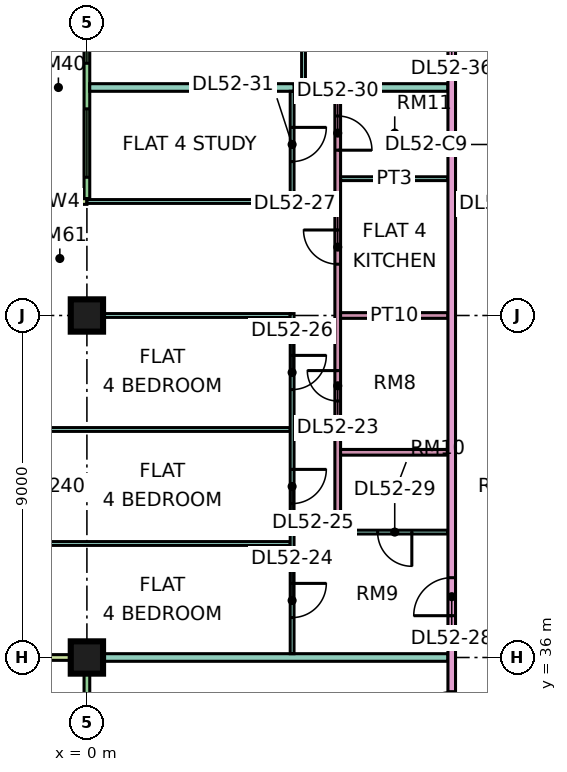
"""IFC4 building model, lengths in metres.
Left out: names, types, materials, properties, quantities, classifications, styles, units other than length and angle.
Written with IfcOpenShell. Run it as: python <this file> out.ifc"""

import sys

from ifc_helpers import new_model, si_unit, direction, frame, frame_2d, origin, origin_2d, place, context, subcontext, project, spatial, rectangle, extrude, element, fill, save


model = new_model("IFC4")
c1 = context("Model", 3, precision=1e-05, world=origin(), true_north=direction((0.0, 1.0)))
c2 = subcontext(c1, "Body", "Model", "MODEL_VIEW")
j1 = project(units=[si_unit("LENGTHUNIT", "METRE"), si_unit("PLANEANGLEUNIT", "RADIAN")], contexts=[c1])
p1 = place(None, origin())
s1 = spatial("IfcSite", under=j1, at=p1, CompositionType="ELEMENT")
p2 = place(p1, origin())
s2 = spatial("IfcBuilding", under=s1, at=p2, CompositionType="ELEMENT")
p3 = place(p2, frame((0.0, 0.0, 222.9)))
s3 = spatial("IfcBuildingStorey", under=s2, at=p3, CompositionType="ELEMENT", Elevation=222.9)
p4 = place(p3, frame((0.0, 36.0, 0.0), z_axis=(0.0, 0.0, 1.0), x_axis=(1.0, 0.0, 0.0)))
e1 = element("IfcColumn", 1, at=p4, inside=s3, PredefinedType="COLUMN", context=c2, shape_type="SweptSolid", body=[
    extrude(rectangle(XDim=0.85, YDim=0.85, at=origin_2d()), origin(), (0.0, 0.0, 1.0), 3.75),
])
p5 = place(p3, frame((0.0, 45.0, 0.0), z_axis=(0.0, 0.0, 1.0), x_axis=(1.0, 0.0, 0.0)))
e2 = element("IfcColumn", 2, at=p5, inside=s3, PredefinedType="COLUMN", context=c2, shape_type="SweptSolid", body=[
    extrude(rectangle(XDim=0.85, YDim=0.85, at=origin_2d()), origin(), (0.0, 0.0, 1.0), 3.75),
])
p6 = place(p3, frame((0.0, 61.425, 0.0), z_axis=(0.0, 0.0, 1.0), x_axis=(0.0, -1.0, 0.0)))
e3 = element("IfcWall", 3, at=p6, inside=s3, PredefinedType="SOLIDWALL", context=c2, shape_type="SweptSolid", body=[
    extrude(rectangle(XDim=13.35, YDim=0.15, at=frame_2d((6.675, 0.0))), origin(), (0.0, 0.0, 1.0), 3.35),
])
p7 = place(p6, frame((2.025, 0.0, 0.0)))
e4 = element("IfcOpeningElement", 4, at=p7, cuts=e3, PredefinedType="OPENING", context=c2, shape_type="SweptSolid", body=[
    extrude(rectangle(XDim=1.8, YDim=2.4, at=frame_2d((0.9, 1.2))), frame((0.0, 0.085, 0.0), z_axis=(0.0, -1.0, 0.0), x_axis=(1.0, 0.0, 0.0)), (0.0, 0.0, 1.0), 0.17),
])
p8 = place(p6, frame((5.062, 0.0, 0.45)))
e5 = element("IfcOpeningElement", 5, at=p8, cuts=e3, PredefinedType="OPENING", context=c2, shape_type="SweptSolid", body=[
    extrude(rectangle(XDim=1.2, YDim=2.4, at=frame_2d((0.6, 1.2))), frame((0.0, 0.085, 0.0), z_axis=(0.0, -1.0, 0.0), x_axis=(1.0, 0.0, 0.0)), (0.0, 0.0, 1.0), 0.17),
])
p9 = place(p6, frame((8.587, 0.0, 0.45)))
e6 = element("IfcOpeningElement", 6, at=p9, cuts=e3, PredefinedType="OPENING", context=c2, shape_type="SweptSolid", body=[
    extrude(rectangle(XDim=1.2, YDim=2.4, at=frame_2d((0.6, 1.2))), frame((0.0, 0.085, 0.0), z_axis=(0.0, -1.0, 0.0), x_axis=(1.0, 0.0, 0.0)), (0.0, 0.0, 1.0), 0.17),
])
p10 = place(p6, frame((10.988, 0.0, 0.45)))
e7 = element("IfcOpeningElement", 7, at=p10, cuts=e3, PredefinedType="OPENING", context=c2, shape_type="SweptSolid", body=[
    extrude(rectangle(XDim=1.8, YDim=2.4, at=frame_2d((0.9, 1.2))), frame((0.0, 0.085, 0.0), z_axis=(0.0, -1.0, 0.0), x_axis=(1.0, 0.0, 0.0)), (0.0, 0.0, 1.0), 0.17),
])
p11 = place(p3, frame((-1.5, 48.0, 0.0), z_axis=(0.0, 0.0, 1.0), x_axis=(1.0, 0.0, 0.0)))
e8 = element("IfcWall", 8, at=p11, inside=s3, PredefinedType="SOLIDWALL", context=c2, shape_type="SweptSolid", body=[
    extrude(rectangle(XDim=1.5, YDim=0.15, at=frame_2d((0.75, 0.0))), origin(), (0.0, 0.0, 1.0), 3.35),
])
p12 = place(p3, frame((0.0, 35.925, 0.0), z_axis=(0.0, 0.0, 1.0), x_axis=(0.0, -1.0, 0.0)))
e9 = element("IfcWall", 9, at=p12, inside=s3, PredefinedType="SOLIDWALL", context=c2, shape_type="SweptSolid", body=[
    extrude(rectangle(XDim=11.85, YDim=0.15, at=frame_2d((5.925, 0.0))), origin(), (0.0, 0.0, 1.0), 3.35),
])
p13 = place(p12, frame((2.288, 0.0, 0.0)))
e10 = element("IfcOpeningElement", 10, at=p13, cuts=e9, PredefinedType="OPENING", context=c2, shape_type="SweptSolid", body=[
    extrude(rectangle(XDim=1.8, YDim=2.4, at=frame_2d((0.9, 1.2))), frame((0.0, 0.085, 0.0), z_axis=(0.0, -1.0, 0.0), x_axis=(1.0, 0.0, 0.0)), (0.0, 0.0, 1.0), 0.17),
])
p14 = place(p12, frame((6.525, 0.0, 0.45)))
e11 = element("IfcOpeningElement", 11, at=p14, cuts=e9, PredefinedType="OPENING", context=c2, shape_type="SweptSolid", body=[
    extrude(rectangle(XDim=1.8, YDim=2.4, at=frame_2d((0.9, 1.2))), frame((0.0, 0.085, 0.0), z_axis=(0.0, -1.0, 0.0), x_axis=(1.0, 0.0, 0.0)), (0.0, 0.0, 1.0), 0.17),
])
p15 = place(p12, frame((9.562, 0.0, 0.45)))
e12 = element("IfcOpeningElement", 12, at=p15, cuts=e9, PredefinedType="OPENING", context=c2, shape_type="SweptSolid", body=[
    extrude(rectangle(XDim=1.2, YDim=2.4, at=frame_2d((0.6, 1.2))), frame((0.0, 0.085, 0.0), z_axis=(0.0, -1.0, 0.0), x_axis=(1.0, 0.0, 0.0)), (0.0, 0.0, 1.0), 0.17),
])
p16 = place(p3, frame((-1.5, 36.0, 0.0), z_axis=(0.0, 0.0, 1.0), x_axis=(1.0, 0.0, 0.0)))
e13 = element("IfcWall", 13, at=p16, inside=s3, PredefinedType="SOLIDWALL", context=c2, shape_type="SweptSolid", body=[
    extrude(rectangle(XDim=1.5, YDim=0.15, at=frame_2d((0.75, 0.0))), origin(), (0.0, 0.0, 1.0), 3.35),
])
for number, where, z_axis, x_axis in (
    (14, (-1.351, 39.0, 0.0), (0.0, 0.0, 1.0), (1.0, 0.0, 0.0)),
    (15, (-1.351, 42.0, 0.0), (0.0, 0.0, 1.0), (1.0, 0.0, 0.0)),
):
    element("IfcWall", number, at=place(p3, frame(where, z_axis=z_axis, x_axis=x_axis)), inside=s3, PredefinedType="PARTITIONING", context=c2, shape_type="SweptSolid", body=[
        extrude(rectangle(XDim=6.701, YDim=0.1, at=frame_2d((3.351, 0.0))), origin(), (0.0, 0.0, 1.0), 3.35),
    ])
e16 = element("IfcWall", 16, at=p4, inside=s3, PredefinedType="PARTITIONING", context=c2, shape_type="SweptSolid", body=[
    extrude(rectangle(XDim=9.5, YDim=0.2, at=frame_2d((4.75, 0.0))), origin(), (0.0, 0.0, 1.0), 3.35),
])
e17 = element("IfcWall", 17, at=p5, inside=s3, PredefinedType="PARTITIONING", context=c2, shape_type="SweptSolid", body=[
    extrude(rectangle(XDim=5.35, YDim=0.1, at=frame_2d((2.675, 0.0))), origin(), (0.0, 0.0, 1.0), 3.35),
])
p17 = place(p3, frame((0.0, 48.0, 0.0), z_axis=(0.0, 0.0, 1.0), x_axis=(1.0, 0.0, 0.0)))
e18 = element("IfcWall", 18, at=p17, inside=s3, PredefinedType="PARTITIONING", context=c2, shape_type="SweptSolid", body=[
    extrude(rectangle(XDim=5.45, YDim=0.1, at=frame_2d((2.725, 0.0))), origin(), (0.0, 0.0, 1.0), 3.35),
])
p18 = place(p3, frame((0.074, 51.0, 0.0), z_axis=(0.0, 0.0, 1.0), x_axis=(1.0, 0.0, 0.0)))
e19 = element("IfcWall", 19, at=p18, inside=s3, PredefinedType="PARTITIONING", context=c2, shape_type="SweptSolid", body=[
    extrude(rectangle(XDim=5.376, YDim=0.2, at=frame_2d((2.688, 0.0))), origin(), (0.0, 0.0, 1.0), 3.35),
])
p19 = place(p3, frame((5.4, 36.1, 0.0), z_axis=(0.0, 0.0, 1.0), x_axis=(0.0, 1.0, 0.0)))
e20 = element("IfcWall", 20, at=p19, inside=s3, PredefinedType="PARTITIONING", context=c2, shape_type="SweptSolid", body=[
    extrude(rectangle(XDim=8.95, YDim=0.1, at=frame_2d((4.475, 0.0))), origin(), (0.0, 0.0, 1.0), 3.35),
])
p20 = place(p19, frame((0.95, 0.0, 0.0)))
e21 = element("IfcOpeningElement", 21, at=p20, cuts=e20, PredefinedType="OPENING", context=c2, shape_type="SweptSolid", body=[
    extrude(rectangle(XDim=0.9, YDim=2.1, at=frame_2d((0.45, 1.05))), frame((0.0, 0.06, 0.0), z_axis=(0.0, -1.0, 0.0), x_axis=(1.0, 0.0, 0.0)), (0.0, 0.0, 1.0), 0.12),
])
p21 = place(p19, frame((3.95, 0.0, 0.0)))
e22 = element("IfcOpeningElement", 22, at=p21, cuts=e20, PredefinedType="OPENING", context=c2, shape_type="SweptSolid", body=[
    extrude(rectangle(XDim=0.9, YDim=2.1, at=frame_2d((0.45, 1.05))), frame((0.0, 0.06, 0.0), z_axis=(0.0, -1.0, 0.0), x_axis=(1.0, 0.0, 0.0)), (0.0, 0.0, 1.0), 0.12),
])
p22 = place(p19, frame((6.95, 0.0, 0.0)))
e23 = element("IfcOpeningElement", 23, at=p22, cuts=e20, PredefinedType="OPENING", context=c2, shape_type="SweptSolid", body=[
    extrude(rectangle(XDim=0.9, YDim=2.1, at=frame_2d((0.45, 1.05))), frame((0.0, 0.06, 0.0), z_axis=(0.0, -1.0, 0.0), x_axis=(1.0, 0.0, 0.0)), (0.0, 0.0, 1.0), 0.12),
])
p23 = place(p3, frame((5.4, 48.05, 0.0), z_axis=(0.0, 0.0, 1.0), x_axis=(0.0, 1.0, 0.0)))
e24 = element("IfcWall", 24, at=p23, inside=s3, PredefinedType="PARTITIONING", context=c2, shape_type="SweptSolid", body=[
    extrude(rectangle(XDim=2.85, YDim=0.1, at=frame_2d((1.425, 0.0))), origin(), (0.0, 0.0, 1.0), 3.35),
])
p24 = place(p23, frame((1.0, 0.0, 0.0)))
e25 = element("IfcOpeningElement", 25, at=p24, cuts=e24, PredefinedType="OPENING", context=c2, shape_type="SweptSolid", body=[
    extrude(rectangle(XDim=0.9, YDim=2.1, at=frame_2d((0.45, 1.05))), frame((0.0, 0.06, 0.0), z_axis=(0.0, -1.0, 0.0), x_axis=(1.0, 0.0, 0.0)), (0.0, 0.0, 1.0), 0.12),
])
p25 = place(p3, frame((5.65, 51.0, 0.0), z_axis=(0.0, 0.0, 1.0), x_axis=(1.0, 0.0, 0.0)))
e26 = element("IfcWall", 26, at=p25, inside=s3, PredefinedType="PARTITIONING", context=c2, shape_type="SweptSolid", body=[
    extrude(rectangle(XDim=3.85, YDim=0.2, at=frame_2d((1.925, 0.0))), origin(), (0.0, 0.0, 1.0), 3.35),
])
p26 = place(p3, frame((5.7, 51.1, 0.0), z_axis=(0.0, 0.0, 1.0), x_axis=(0.0, 1.0, 0.0)))
e27 = element("IfcWall", 27, at=p26, inside=s3, PredefinedType="PARTITIONING", context=c2, shape_type="SweptSolid", body=[
    extrude(rectangle(XDim=8.95, YDim=0.1, at=frame_2d((4.475, 0.0))), origin(), (0.0, 0.0, 1.0), 3.35),
])
p27 = place(p26, frame((0.95, 0.0, 0.0)))
e28 = element("IfcOpeningElement", 28, at=p27, cuts=e27, PredefinedType="OPENING", context=c2, shape_type="SweptSolid", body=[
    extrude(rectangle(XDim=0.9, YDim=2.1, at=frame_2d((0.45, 1.05))), frame((0.0, 0.06, 0.0), z_axis=(0.0, -1.0, 0.0), x_axis=(1.0, 0.0, 0.0)), (0.0, 0.0, 1.0), 0.12),
])
p28 = place(p26, frame((3.95, 0.0, 0.0)))
e29 = element("IfcOpeningElement", 29, at=p28, cuts=e27, PredefinedType="OPENING", context=c2, shape_type="SweptSolid", body=[
    extrude(rectangle(XDim=0.9, YDim=2.1, at=frame_2d((0.45, 1.05))), frame((0.0, 0.06, 0.0), z_axis=(0.0, -1.0, 0.0), x_axis=(1.0, 0.0, 0.0)), (0.0, 0.0, 1.0), 0.12),
])
p29 = place(p26, frame((6.95, 0.0, 0.0)))
e30 = element("IfcOpeningElement", 30, at=p29, cuts=e27, PredefinedType="OPENING", context=c2, shape_type="SweptSolid", body=[
    extrude(rectangle(XDim=0.9, YDim=2.1, at=frame_2d((0.45, 1.05))), frame((0.0, 0.06, 0.0), z_axis=(0.0, -1.0, 0.0), x_axis=(1.0, 0.0, 0.0)), (0.0, 0.0, 1.0), 0.12),
])
p30 = place(p3, frame((6.6, 39.25, 0.0), z_axis=(0.0, 0.0, 1.0), x_axis=(0.0, 1.0, 0.0)))
e31 = element("IfcWall", 31, at=p30, inside=s3, PredefinedType="PARTITIONING", context=c2, shape_type="SweptSolid", body=[
    extrude(rectangle(XDim=11.65, YDim=0.15, at=frame_2d((5.825, 0.0))), origin(), (0.0, 0.0, 1.0), 3.35),
])
p31 = place(p30, frame((3.5, 0.0, 0.0)))
e32 = element("IfcOpeningElement", 32, at=p31, cuts=e31, PredefinedType="OPENING", context=c2, shape_type="SweptSolid", body=[
    extrude(rectangle(XDim=0.8, YDim=2.1, at=frame_2d((0.4, 1.05))), frame((0.0, 0.085, 0.0), z_axis=(0.0, -1.0, 0.0), x_axis=(1.0, 0.0, 0.0)), (0.0, 0.0, 1.0), 0.17),
])
p32 = place(p30, frame((7.1, 0.0, 0.0)))
e33 = element("IfcOpeningElement", 33, at=p32, cuts=e31, PredefinedType="OPENING", context=c2, shape_type="SweptSolid", body=[
    extrude(rectangle(XDim=0.9, YDim=2.1, at=frame_2d((0.45, 1.05))), frame((0.0, 0.085, 0.0), z_axis=(0.0, -1.0, 0.0), x_axis=(1.0, 0.0, 0.0)), (0.0, 0.0, 1.0), 0.17),
])
p33 = place(p30, frame((10.1, 0.0, 0.0)))
e34 = element("IfcOpeningElement", 34, at=p33, cuts=e31, PredefinedType="OPENING", context=c2, shape_type="SweptSolid", body=[
    extrude(rectangle(XDim=0.9, YDim=2.1, at=frame_2d((0.45, 1.05))), frame((0.0, 0.085, 0.0), z_axis=(0.0, -1.0, 0.0), x_axis=(1.0, 0.0, 0.0)), (0.0, 0.0, 1.0), 0.17),
])
p34 = place(p3, frame((6.675, 39.3, 0.0), z_axis=(0.0, 0.0, 1.0), x_axis=(1.0, 0.0, 0.0)))
e35 = element("IfcWall", 35, at=p34, inside=s3, PredefinedType="PARTITIONING", context=c2, shape_type="SweptSolid", body=[
    extrude(rectangle(XDim=2.825, YDim=0.1, at=frame_2d((1.413, 0.0))), origin(), (0.0, 0.0, 1.0), 3.35),
])
p35 = place(p34, frame((0.975, 0.0, 0.0)))
e36 = element("IfcOpeningElement", 36, at=p35, cuts=e35, PredefinedType="OPENING", context=c2, shape_type="SweptSolid", body=[
    extrude(rectangle(XDim=0.9, YDim=2.1, at=frame_2d((0.45, 1.05))), frame((0.0, 0.06, 0.0), z_axis=(0.0, -1.0, 0.0), x_axis=(1.0, 0.0, 0.0)), (0.0, 0.0, 1.0), 0.12),
])
for number, where, z_axis, x_axis in (
    (37, (6.675, 41.4, 0.0), (0.0, 0.0, 1.0), (1.0, 0.0, 0.0)),
    (38, (6.675, 45.0, 0.0), (0.0, 0.0, 1.0), (1.0, 0.0, 0.0)),
):
    element("IfcWall", number, at=place(p3, frame(where, z_axis=z_axis, x_axis=x_axis)), inside=s3, PredefinedType="PARTITIONING", context=c2, shape_type="SweptSolid", body=[
        extrude(rectangle(XDim=2.825, YDim=0.15, at=frame_2d((1.413, 0.0))), origin(), (0.0, 0.0, 1.0), 3.35),
    ])
p36 = place(p3, frame((6.675, 48.6, 0.0), z_axis=(0.0, 0.0, 1.0), x_axis=(1.0, 0.0, 0.0)))
e39 = element("IfcWall", 39, at=p36, inside=s3, PredefinedType="PARTITIONING", context=c2, shape_type="SweptSolid", body=[
    extrude(rectangle(XDim=2.825, YDim=0.1, at=frame_2d((1.413, 0.0))), origin(), (0.0, 0.0, 1.0), 3.35),
])
p37 = place(p3, frame((9.6, 20.0, 0.0), z_axis=(0.0, 0.0, 1.0), x_axis=(0.0, 1.0, 0.0)))
e40 = element("IfcWall", 40, at=p37, inside=s3, PredefinedType="PARTITIONING", context=c2, shape_type="SweptSolid", body=[
    extrude(rectangle(XDim=42.926, YDim=0.2, at=frame_2d((21.463, 0.0))), origin(), (0.0, 0.0, 1.0), 3.35),
])
p38 = place(p37, frame((17.1, 0.0, 0.0)))
e41 = element("IfcOpeningElement", 41, at=p38, cuts=e40, PredefinedType="OPENING", context=c2, shape_type="SweptSolid", body=[
    extrude(rectangle(XDim=1.0, YDim=2.1, at=frame_2d((0.5, 1.05))), frame((0.0, 0.11, 0.0), z_axis=(0.0, -1.0, 0.0), x_axis=(1.0, 0.0, 0.0)), (0.0, 0.0, 1.0), 0.22),
])
p39 = place(p37, frame((32.1, 0.0, 0.0)))
e42 = element("IfcOpeningElement", 42, at=p39, cuts=e40, PredefinedType="OPENING", context=c2, shape_type="SweptSolid", body=[
    extrude(rectangle(XDim=1.0, YDim=2.1, at=frame_2d((0.5, 1.05))), frame((0.0, 0.11, 0.0), z_axis=(0.0, -1.0, 0.0), x_axis=(1.0, 0.0, 0.0)), (0.0, 0.0, 1.0), 0.22),
])
p40 = place(p37, frame((0.6, 0.0, 0.0)))
e43 = element("IfcOpeningElement", 43, at=p40, cuts=e40, PredefinedType="OPENING", context=c2, shape_type="SweptSolid", body=[
    extrude(rectangle(XDim=1.2, YDim=2.1, at=frame_2d((0.6, 1.05))), frame((0.0, 0.11, 0.0), z_axis=(0.0, -1.0, 0.0), x_axis=(1.0, 0.0, 0.0)), (0.0, 0.0, 1.0), 0.22),
])
p41 = place(p37, frame((14.1, 0.0, 0.0)))
e44 = element("IfcOpeningElement", 44, at=p41, cuts=e40, PredefinedType="OPENING", context=c2, shape_type="SweptSolid", body=[
    extrude(rectangle(XDim=1.0, YDim=2.1, at=frame_2d((0.5, 1.05))), frame((0.0, 0.11, 0.0), z_axis=(0.0, -1.0, 0.0), x_axis=(1.0, 0.0, 0.0)), (0.0, 0.0, 1.0), 0.22),
])
p42 = place(p9, origin())
e45 = element("IfcWindow", 45, at=p42, inside=s3, PartitioningType="SINGLE_PANEL", PredefinedType="WINDOW", context=c2, shape_type="SweptSolid", body=[
    extrude(rectangle(XDim=1.2, YDim=2.4, at=frame_2d((0.6, 1.2))), frame((0.0, 0.03, 0.0), z_axis=(0.0, -1.0, 0.0), x_axis=(1.0, 0.0, 0.0)), (0.0, 0.0, 1.0), 0.06),
])
fill(e6, e45)
p43 = place(p10, origin())
e46 = element("IfcWindow", 46, at=p43, inside=s3, PartitioningType="SINGLE_PANEL", PredefinedType="WINDOW", context=c2, shape_type="SweptSolid", body=[
    extrude(rectangle(XDim=1.8, YDim=2.4, at=frame_2d((0.9, 1.2))), frame((0.0, 0.03, 0.0), z_axis=(0.0, -1.0, 0.0), x_axis=(1.0, 0.0, 0.0)), (0.0, 0.0, 1.0), 0.06),
])
fill(e7, e46)
p44 = place(p31, frame((0.8, 0.0, 0.0), z_axis=(0.0, 0.0, 1.0), x_axis=(-1.0, 0.0, 0.0)))
e47 = element("IfcDoor", 47, at=p44, inside=s3, OperationType="SINGLE_SWING_RIGHT", PredefinedType="DOOR", context=c2, shape_type="SweptSolid", body=[
    extrude(rectangle(XDim=0.8, YDim=2.1, at=frame_2d((0.4, 1.05))), frame((0.0, 0.025, 0.0), z_axis=(0.0, -1.0, 0.0), x_axis=(1.0, 0.0, 0.0)), (0.0, 0.0, 1.0), 0.05),
])
fill(e32, e47)
p45 = place(p20, origin())
e48 = element("IfcDoor", 48, at=p45, inside=s3, OperationType="SINGLE_SWING_RIGHT", PredefinedType="DOOR", context=c2, shape_type="SweptSolid", body=[
    extrude(rectangle(XDim=0.9, YDim=2.1, at=frame_2d((0.45, 1.05))), frame((0.0, 0.025, 0.0), z_axis=(0.0, -1.0, 0.0), x_axis=(1.0, 0.0, 0.0)), (0.0, 0.0, 1.0), 0.05),
])
fill(e21, e48)
p46 = place(p21, origin())
e49 = element("IfcDoor", 49, at=p46, inside=s3, OperationType="SINGLE_SWING_RIGHT", PredefinedType="DOOR", context=c2, shape_type="SweptSolid", body=[
    extrude(rectangle(XDim=0.9, YDim=2.1, at=frame_2d((0.45, 1.05))), frame((0.0, 0.025, 0.0), z_axis=(0.0, -1.0, 0.0), x_axis=(1.0, 0.0, 0.0)), (0.0, 0.0, 1.0), 0.05),
])
fill(e22, e49)
p47 = place(p22, origin())
e50 = element("IfcDoor", 50, at=p47, inside=s3, OperationType="SINGLE_SWING_RIGHT", PredefinedType="DOOR", context=c2, shape_type="SweptSolid", body=[
    extrude(rectangle(XDim=0.9, YDim=2.1, at=frame_2d((0.45, 1.05))), frame((0.0, 0.025, 0.0), z_axis=(0.0, -1.0, 0.0), x_axis=(1.0, 0.0, 0.0)), (0.0, 0.0, 1.0), 0.05),
])
fill(e23, e50)
p48 = place(p32, frame((0.9, 0.0, 0.0), z_axis=(0.0, 0.0, 1.0), x_axis=(-1.0, 0.0, 0.0)))
e51 = element("IfcDoor", 51, at=p48, inside=s3, OperationType="SINGLE_SWING_RIGHT", PredefinedType="DOOR", context=c2, shape_type="SweptSolid", body=[
    extrude(rectangle(XDim=0.9, YDim=2.1, at=frame_2d((0.45, 1.05))), frame((0.0, 0.025, 0.0), z_axis=(0.0, -1.0, 0.0), x_axis=(1.0, 0.0, 0.0)), (0.0, 0.0, 1.0), 0.05),
])
fill(e33, e51)
p49 = place(p38, origin())
e52 = element("IfcDoor", 52, at=p49, inside=s3, OperationType="SINGLE_SWING_LEFT", PredefinedType="DOOR", context=c2, shape_type="SweptSolid", body=[
    extrude(rectangle(XDim=1.0, YDim=2.1, at=frame_2d((0.5, 1.05))), frame((0.0, 0.025, 0.0), z_axis=(0.0, -1.0, 0.0), x_axis=(1.0, 0.0, 0.0)), (0.0, 0.0, 1.0), 0.05),
])
fill(e41, e52)
p50 = place(p35, origin())
e53 = element("IfcDoor", 53, at=p50, inside=s3, OperationType="SINGLE_SWING_RIGHT", PredefinedType="DOOR", context=c2, shape_type="SweptSolid", body=[
    extrude(rectangle(XDim=0.9, YDim=2.1, at=frame_2d((0.45, 1.05))), frame((0.0, 0.025, 0.0), z_axis=(0.0, -1.0, 0.0), x_axis=(1.0, 0.0, 0.0)), (0.0, 0.0, 1.0), 0.05),
])
fill(e36, e53)
p51 = place(p33, frame((0.9, 0.0, 0.0), z_axis=(0.0, 0.0, 1.0), x_axis=(-1.0, 0.0, 0.0)))
e54 = element("IfcDoor", 54, at=p51, inside=s3, OperationType="SINGLE_SWING_LEFT", PredefinedType="DOOR", context=c2, shape_type="SweptSolid", body=[
    extrude(rectangle(XDim=0.9, YDim=2.1, at=frame_2d((0.45, 1.05))), frame((0.0, 0.025, 0.0), z_axis=(0.0, -1.0, 0.0), x_axis=(1.0, 0.0, 0.0)), (0.0, 0.0, 1.0), 0.05),
])
fill(e34, e54)
p52 = place(p24, origin())
e55 = element("IfcDoor", 55, at=p52, inside=s3, OperationType="SINGLE_SWING_RIGHT", PredefinedType="DOOR", context=c2, shape_type="SweptSolid", body=[
    extrude(rectangle(XDim=0.9, YDim=2.1, at=frame_2d((0.45, 1.05))), frame((0.0, 0.025, 0.0), z_axis=(0.0, -1.0, 0.0), x_axis=(1.0, 0.0, 0.0)), (0.0, 0.0, 1.0), 0.05),
])
fill(e25, e55)
p53 = place(p41, origin())
e56 = element("IfcDoor", 56, at=p53, inside=s3, OperationType="SINGLE_SWING_LEFT", PredefinedType="DOOR", context=c2, shape_type="SweptSolid", body=[
    extrude(rectangle(XDim=1.0, YDim=2.1, at=frame_2d((0.5, 1.05))), frame((0.0, 0.025, 0.0), z_axis=(0.0, -1.0, 0.0), x_axis=(1.0, 0.0, 0.0)), (0.0, 0.0, 1.0), 0.05),
])
fill(e44, e56)
save(model, sys.argv[1])
